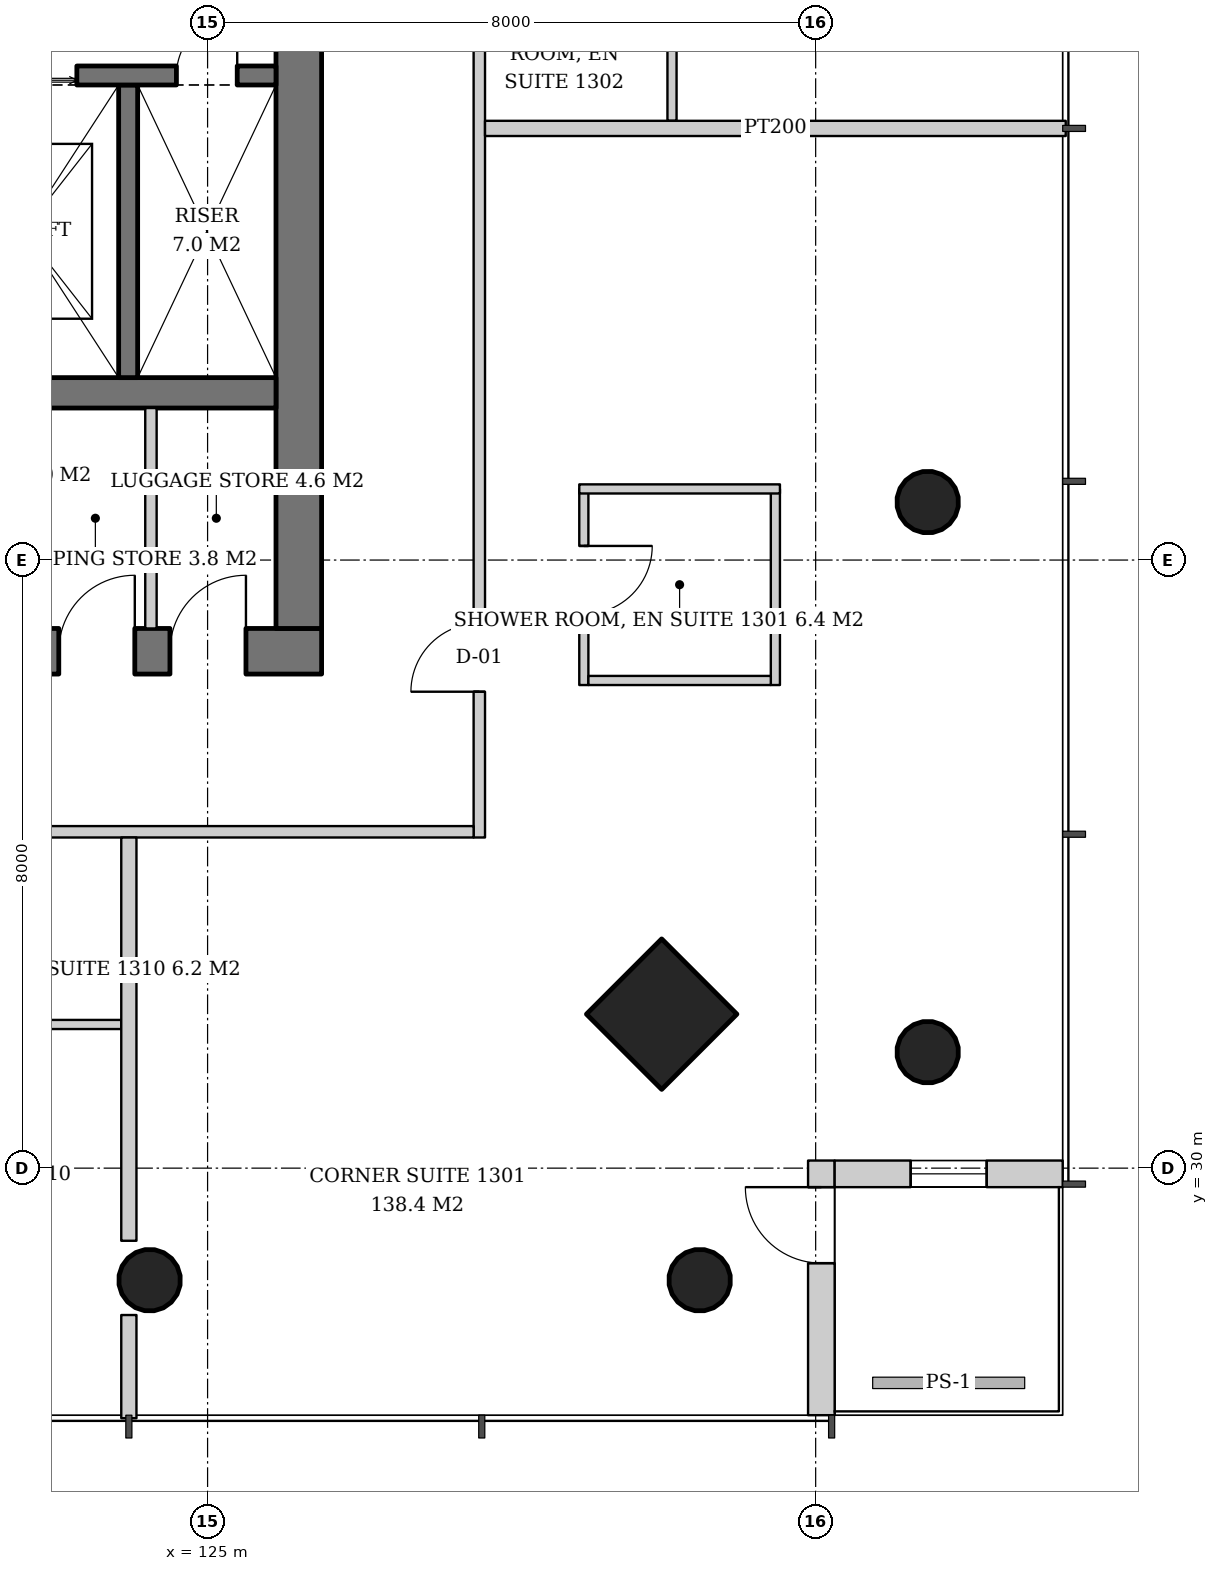
"""IFC4 building model, lengths in metres.
Left out: names, types, materials, properties, quantities, classifications, styles, units other than length and angle.
Written with IfcOpenShell. Run it as: python <this file> out.ifc"""

import sys

from ifc_helpers import new_model, si_unit, direction, frame, frame_2d, origin, origin_2d, place, context, subcontext, project, spatial, rectangle, hollow_circle, extrude, element, fill, save


model = new_model("IFC4")
c1 = context("Model", 3, precision=1e-05, world=origin(), true_north=direction((0.0, 1.0)))
c2 = subcontext(c1, "Body", "Model", "MODEL_VIEW")
j1 = project(units=[si_unit("LENGTHUNIT", "METRE"), si_unit("PLANEANGLEUNIT", "RADIAN")], contexts=[c1])
p1 = place(None, origin())
s1 = spatial("IfcSite", under=j1, at=p1, CompositionType="ELEMENT")
p2 = place(p1, origin())
s2 = spatial("IfcBuilding", under=s1, at=p2, CompositionType="ELEMENT")
p3 = place(p2, frame((0.0, 0.0, 55.2)))
s3 = spatial("IfcBuildingStorey", under=s2, at=p3, CompositionType="ELEMENT", Elevation=55.2)
p4 = place(p3, frame((134.526, 31.474, 0.0), z_axis=(-0.043029647111, 0.043029647111, 0.998146732169), x_axis=(-0.707106781187, -0.707106781187, 0.0)))
e1 = element("IfcColumn", 1, at=p4, inside=s3, PredefinedType="COLUMN", context=c2, shape_type="SweptSolid", body=[
    extrude(hollow_circle(Radius=0.406, WallThickness=0.03, at=origin_2d()), origin(), (0.0, 0.0, 1.0), 3.807),
])
p5 = place(p3, frame((134.526, 38.737, 0.0), z_axis=(-0.043059584825, 0.021497706284, 0.998841188968), x_axis=(-0.446680166538, -0.894693706707, 0.0)))
e2 = element("IfcColumn", 2, at=p5, inside=s3, PredefinedType="COLUMN", context=c2, shape_type="SweptSolid", body=[
    extrude(hollow_circle(Radius=0.406, WallThickness=0.03, at=origin_2d()), origin(), (0.0, 0.0, 1.0), 3.804),
])
p6 = place(p3, frame((131.026, 31.974, 0.0), z_axis=(-0.043029647111, 0.043029647111, 0.998146732169), x_axis=(-0.707106781187, -0.707106781187, 0.0)))
e3 = element("IfcColumn", 3, at=p6, inside=s3, PredefinedType="COLUMN", context=c2, shape_type="SweptSolid", body=[
    extrude(rectangle(XDim=1.4, YDim=1.4, at=origin_2d()), origin(), (0.0, 0.0, 1.0), 3.807),
])
p7 = place(p3, frame((131.526, 28.474, 0.0), z_axis=(-0.043029647111, 0.043029647111, 0.998146732169), x_axis=(-0.707106781187, -0.707106781187, 0.0)))
e4 = element("IfcColumn", 4, at=p7, inside=s3, PredefinedType="COLUMN", context=c2, shape_type="SweptSolid", body=[
    extrude(hollow_circle(Radius=0.406, WallThickness=0.03, at=origin_2d()), origin(), (0.0, 0.0, 1.0), 3.807),
])
p8 = place(p3, frame((124.263, 28.474, 0.0), z_axis=(-0.021497706284, 0.043059584825, 0.998841188968), x_axis=(-0.894693706707, -0.446680166538, 0.0)))
e5 = element("IfcColumn", 5, at=p8, inside=s3, PredefinedType="COLUMN", context=c2, shape_type="SweptSolid", body=[
    extrude(hollow_circle(Radius=0.406, WallThickness=0.03, at=origin_2d()), origin(), (0.0, 0.0, 1.0), 3.804),
])
p9 = place(p3, frame((107.5, 36.8, 0.0), z_axis=(0.0, 0.0, 1.0), x_axis=(1.0, 0.0, 0.0)))
e6 = element("IfcWall", 6, at=p9, inside=s3, PredefinedType="SHEAR", context=c2, shape_type="SweptSolid", body=[
    extrude(rectangle(XDim=19.0, YDim=0.6, at=frame_2d((9.5, 0.0))), origin(), (0.0, 0.0, 1.0), 3.8),
])
p10 = place(p9, frame((3.9, 0.0, 0.0)))
e7 = element("IfcOpeningElement", 7, at=p10, cuts=e6, PredefinedType="OPENING", context=c2, shape_type="SweptSolid", body=[
    extrude(rectangle(XDim=1.0, YDim=2.1, at=frame_2d((0.5, 1.05))), frame((0.0, 0.31, 0.0), z_axis=(0.0, -1.0, 0.0), x_axis=(1.0, 0.0, 0.0)), (0.0, 0.0, 1.0), 0.62),
])
p11 = place(p9, frame((14.08, 0.0, 0.0)))
e8 = element("IfcOpeningElement", 8, at=p11, cuts=e6, PredefinedType="OPENING", context=c2, shape_type="SweptSolid", body=[
    extrude(rectangle(XDim=1.0, YDim=2.1, at=frame_2d((0.5, 1.05))), frame((0.0, 0.31, 0.0), z_axis=(0.0, -1.0, 0.0), x_axis=(1.0, 0.0, 0.0)), (0.0, 0.0, 1.0), 0.62),
])
p12 = place(p9, frame((15.542, 0.0, 0.0)))
e9 = element("IfcOpeningElement", 9, at=p12, cuts=e6, PredefinedType="OPENING", context=c2, shape_type="SweptSolid", body=[
    extrude(rectangle(XDim=1.0, YDim=2.1, at=frame_2d((0.5, 1.05))), frame((0.0, 0.31, 0.0), z_axis=(0.0, -1.0, 0.0), x_axis=(1.0, 0.0, 0.0)), (0.0, 0.0, 1.0), 0.62),
])
p13 = place(p9, frame((17.005, 0.0, 0.0)))
e10 = element("IfcOpeningElement", 10, at=p13, cuts=e6, PredefinedType="OPENING", context=c2, shape_type="SweptSolid", body=[
    extrude(rectangle(XDim=1.0, YDim=2.1, at=frame_2d((0.5, 1.05))), frame((0.0, 0.31, 0.0), z_axis=(0.0, -1.0, 0.0), x_axis=(1.0, 0.0, 0.0)), (0.0, 0.0, 1.0), 0.62),
])
p14 = place(p3, frame((126.2, 37.1, 0.0), z_axis=(0.0, 0.0, 1.0), x_axis=(0.0, 1.0, 0.0)))
e11 = element("IfcWall", 11, at=p14, inside=s3, PredefinedType="SHEAR", context=c2, shape_type="SweptSolid", body=[
    extrude(rectangle(XDim=17.8, YDim=0.6, at=frame_2d((8.9, 0.0))), origin(), (0.0, 0.0, 1.0), 3.8),
])
p15 = place(p14, frame((8.0, 0.0, 0.0)))
e12 = element("IfcOpeningElement", 12, at=p15, cuts=e11, PredefinedType="OPENING", context=c2, shape_type="SweptSolid", body=[
    extrude(rectangle(XDim=1.8, YDim=2.4, at=frame_2d((0.9, 1.2))), frame((0.0, 0.31, 0.0), z_axis=(0.0, -1.0, 0.0), x_axis=(1.0, 0.0, 0.0)), (0.0, 0.0, 1.0), 0.62),
])
p16 = place(p3, frame((108.1, 40.2, 0.0), z_axis=(0.0, 0.0, 1.0), x_axis=(1.0, 0.0, 0.0)))
e13 = element("IfcWall", 13, at=p16, inside=s3, PredefinedType="SHEAR", context=c2, shape_type="SweptSolid", body=[
    extrude(rectangle(XDim=17.8, YDim=0.4, at=frame_2d((8.9, 0.0))), origin(), (0.0, 0.0, 1.0), 3.8),
])
p17 = place(p3, frame((133.075, 26.75, 0.0), z_axis=(0.0, 0.0, 1.0), x_axis=(0.0, 1.0, 0.0)))
e14 = element("IfcWall", 14, at=p17, inside=s3, PredefinedType="SOLIDWALL", context=c2, shape_type="SweptSolid", body=[
    extrude(rectangle(XDim=3.35, YDim=0.35, at=frame_2d((1.675, 0.0))), origin(), (0.0, 0.0, 1.0), 3.6),
])
p18 = place(p17, frame((2.0, 0.0, 0.0)))
e15 = element("IfcOpeningElement", 15, at=p18, cuts=e14, PredefinedType="OPENING", context=c2, shape_type="SweptSolid", body=[
    extrude(rectangle(XDim=1.0, YDim=2.4, at=frame_2d((0.5, 1.2))), frame((0.0, 0.185, 0.0), z_axis=(0.0, -1.0, 0.0), x_axis=(1.0, 0.0, 0.0)), (0.0, 0.0, 1.0), 0.37),
])
p19 = place(p3, frame((133.25, 29.925, 0.0), z_axis=(0.0, 0.0, 1.0), x_axis=(1.0, 0.0, 0.0)))
e16 = element("IfcWall", 16, at=p19, inside=s3, PredefinedType="SOLIDWALL", context=c2, shape_type="SweptSolid", body=[
    extrude(rectangle(XDim=3.0, YDim=0.35, at=frame_2d((1.5, 0.0))), origin(), (0.0, 0.0, 1.0), 3.6),
])
p20 = place(p19, frame((1.0, 0.0, 0.9)))
e17 = element("IfcOpeningElement", 17, at=p20, cuts=e16, PredefinedType="OPENING", context=c2, shape_type="SweptSolid", body=[
    extrude(rectangle(XDim=1.0, YDim=2.4, at=frame_2d((0.5, 1.2))), frame((0.0, 0.185, 0.0), z_axis=(0.0, -1.0, 0.0), x_axis=(1.0, 0.0, 0.0)), (0.0, 0.0, 1.0), 0.37),
])
p21 = place(p3, frame((123.955, 44.25, 0.0), z_axis=(0.0, 0.0, 1.0), x_axis=(0.0, -1.0, 0.0)))
e18 = element("IfcWall", 18, at=p21, inside=s3, PredefinedType="SHEAR", context=c2, shape_type="SweptSolid", body=[
    extrude(rectangle(XDim=3.85, YDim=0.25, at=frame_2d((1.925, 0.0))), origin(), (0.0, 0.0, 1.0), 3.8),
])
p22 = place(p3, frame((121.33, 44.375, 0.0), z_axis=(0.0, 0.0, 1.0), x_axis=(1.0, 0.0, 0.0)))
e19 = element("IfcWall", 19, at=p22, inside=s3, PredefinedType="SHEAR", context=c2, shape_type="SweptSolid", body=[
    extrude(rectangle(XDim=4.57, YDim=0.25, at=frame_2d((2.285, 0.0))), origin(), (0.0, 0.0, 1.0), 3.8),
])
p23 = place(p22, frame((0.55, 0.0, 0.0)))
e20 = element("IfcOpeningElement", 20, at=p23, cuts=e19, PredefinedType="OPENING", context=c2, shape_type="SweptSolid", body=[
    extrude(rectangle(XDim=1.4, YDim=2.4, at=frame_2d((0.7, 1.2))), frame((0.0, 0.135, 0.0), z_axis=(0.0, -1.0, 0.0), x_axis=(1.0, 0.0, 0.0)), (0.0, 0.0, 1.0), 0.27),
])
p24 = place(p22, frame((3.26, 0.0, 0.0)))
e21 = element("IfcOpeningElement", 21, at=p24, cuts=e19, PredefinedType="OPENING", context=c2, shape_type="SweptSolid", body=[
    extrude(rectangle(XDim=0.8, YDim=2.0, at=frame_2d((0.4, 1.0))), frame((0.0, 0.135, 0.0), z_axis=(0.0, -1.0, 0.0), x_axis=(1.0, 0.0, 0.0)), (0.0, 0.0, 1.0), 0.27),
])
p25 = place(p3, frame((124.255, 37.1, 0.0), z_axis=(0.0, 0.0, 1.0), x_axis=(0.0, 1.0, 0.0)))
e22 = element("IfcWall", 22, at=p25, inside=s3, PredefinedType="SOLIDWALL", context=c2, shape_type="SweptSolid", body=[
    extrude(rectangle(XDim=2.9, YDim=0.15, at=frame_2d((1.45, 0.0))), origin(), (0.0, 0.0, 1.0), 3.6),
])
p26 = place(p3, frame((129.95, 38.936, 0.0), z_axis=(0.0, 0.0, 1.0), x_axis=(0.0, -1.0, 0.0)))
e23 = element("IfcWall", 23, at=p26, inside=s3, PredefinedType="PARTITIONING", context=c2, shape_type="SweptSolid", body=[
    extrude(rectangle(XDim=2.58, YDim=0.12, at=frame_2d((1.29, 0.0))), origin(), (0.0, 0.0, 1.0), 2.8),
])
p27 = place(p26, frame((0.75, 0.0, 0.0)))
e24 = element("IfcOpeningElement", 24, at=p27, cuts=e23, PredefinedType="OPENING", context=c2, shape_type="SweptSolid", body=[
    extrude(rectangle(XDim=0.9, YDim=2.1, at=frame_2d((0.45, 1.05))), frame((0.0, 0.07, 0.0), z_axis=(0.0, -1.0, 0.0), x_axis=(1.0, 0.0, 0.0)), (0.0, 0.0, 1.0), 0.14),
])
p28 = place(p3, frame((132.47, 38.936, 0.0), z_axis=(0.0, 0.0, 1.0), x_axis=(0.0, -1.0, 0.0)))
e25 = element("IfcWall", 25, at=p28, inside=s3, PredefinedType="PARTITIONING", context=c2, shape_type="SweptSolid", body=[
    extrude(rectangle(XDim=2.58, YDim=0.12, at=frame_2d((1.29, 0.0))), origin(), (0.0, 0.0, 1.0), 2.8),
])
p29 = place(p3, frame((130.01, 36.416, 0.0), z_axis=(0.0, 0.0, 1.0), x_axis=(1.0, 0.0, 0.0)))
e26 = element("IfcWall", 26, at=p29, inside=s3, PredefinedType="PARTITIONING", context=c2, shape_type="SweptSolid", body=[
    extrude(rectangle(XDim=2.4, YDim=0.12, at=frame_2d((1.2, 0.0))), origin(), (0.0, 0.0, 1.0), 2.847),
])
p30 = place(p3, frame((129.89, 38.936, 0.0), z_axis=(0.0, 0.0, 1.0), x_axis=(1.0, 0.0, 0.0)))
e27 = element("IfcWall", 27, at=p30, inside=s3, PredefinedType="PARTITIONING", context=c2, shape_type="SweptSolid", body=[
    extrude(rectangle(XDim=2.64, YDim=0.12, at=frame_2d((1.32, 0.0))), origin(), (0.0, 0.0, 1.0), 3.6),
])
p31 = place(p3, frame((131.11, 43.779, 0.0), z_axis=(0.0, 0.0, 1.0), x_axis=(0.0, 1.0, 0.0)))
e28 = element("IfcWall", 28, at=p31, inside=s3, PredefinedType="PARTITIONING", context=c2, shape_type="SweptSolid", body=[
    extrude(rectangle(XDim=2.42, YDim=0.12, at=frame_2d((1.21, 0.0))), origin(), (0.0, 0.0, 1.0), 2.847),
])
p32 = place(p3, frame((128.575, 34.35, 0.0), z_axis=(0.0, 0.0, 1.0), x_axis=(0.0, 1.0, 0.0)))
e29 = element("IfcWall", 29, at=p32, inside=s3, PredefinedType="PARTITIONING", context=c2, shape_type="SweptSolid", body=[
    extrude(rectangle(XDim=23.15, YDim=0.15, at=frame_2d((11.575, 0.0))), origin(), (0.0, 0.0, 1.0), 2.8),
])
p33 = place(p32, frame((1.918, 0.0, 0.0)))
e30 = element("IfcOpeningElement", 30, at=p33, cuts=e29, PredefinedType="OPENING", context=c2, shape_type="SweptSolid", body=[
    extrude(rectangle(XDim=0.9, YDim=2.1, at=frame_2d((0.45, 1.05))), frame((0.0, 0.085, 0.0), z_axis=(0.0, -1.0, 0.0), x_axis=(1.0, 0.0, 0.0)), (0.0, 0.0, 1.0), 0.17),
])
p34 = place(p32, frame((12.079, 0.0, 0.0)))
e31 = element("IfcOpeningElement", 31, at=p34, cuts=e29, PredefinedType="OPENING", context=c2, shape_type="SweptSolid", body=[
    extrude(rectangle(XDim=0.9, YDim=2.1, at=frame_2d((0.45, 1.05))), frame((0.0, 0.085, 0.0), z_axis=(0.0, -1.0, 0.0), x_axis=(1.0, 0.0, 0.0)), (0.0, 0.0, 1.0), 0.17),
])
p35 = place(p3, frame((128.65, 43.678, 0.0), z_axis=(0.0, 0.0, 1.0), x_axis=(1.0, 0.0, 0.0)))
e32 = element("IfcWall", 32, at=p35, inside=s3, PredefinedType="PARTITIONING", context=c2, shape_type="SweptSolid", body=[
    extrude(rectangle(XDim=7.64, YDim=0.2, at=frame_2d((3.82, 0.0))), origin(), (0.0, 0.0, 1.0), 3.05),
])
p36 = place(p3, frame((121.444, 31.89, 0.0), z_axis=(0.0, 0.0, 1.0), x_axis=(1.0, 0.0, 0.0)))
e33 = element("IfcWall", 33, at=p36, inside=s3, PredefinedType="PARTITIONING", context=c2, shape_type="SweptSolid", body=[
    extrude(rectangle(XDim=2.42, YDim=0.12, at=frame_2d((1.21, 0.0))), origin(), (0.0, 0.0, 1.0), 3.6),
])
p37 = place(p3, frame((105.35, 34.425, 0.0), z_axis=(0.0, 0.0, 1.0), x_axis=(1.0, 0.0, 0.0)))
e34 = element("IfcWall", 34, at=p37, inside=s3, PredefinedType="PARTITIONING", context=c2, shape_type="SweptSolid", body=[
    extrude(rectangle(XDim=23.15, YDim=0.15, at=frame_2d((11.575, 0.0))), origin(), (0.0, 0.0, 1.0), 2.8),
])
p38 = place(p37, frame((1.918, 0.0, 0.0)))
e35 = element("IfcOpeningElement", 35, at=p38, cuts=e34, PredefinedType="OPENING", context=c2, shape_type="SweptSolid", body=[
    extrude(rectangle(XDim=0.9, YDim=2.1, at=frame_2d((0.45, 1.05))), frame((0.0, 0.085, 0.0), z_axis=(0.0, -1.0, 0.0), x_axis=(1.0, 0.0, 0.0)), (0.0, 0.0, 1.0), 0.17),
])
p39 = place(p37, frame((12.079, 0.0, 0.0)))
e36 = element("IfcOpeningElement", 36, at=p39, cuts=e34, PredefinedType="OPENING", context=c2, shape_type="SweptSolid", body=[
    extrude(rectangle(XDim=0.9, YDim=2.1, at=frame_2d((0.45, 1.05))), frame((0.0, 0.085, 0.0), z_axis=(0.0, -1.0, 0.0), x_axis=(1.0, 0.0, 0.0)), (0.0, 0.0, 1.0), 0.17),
])
p40 = place(p37, frame((14.964, 0.0, 0.0)))
e37 = element("IfcOpeningElement", 37, at=p40, cuts=e34, PredefinedType="OPENING", context=c2, shape_type="SweptSolid", body=[
    extrude(rectangle(XDim=0.9, YDim=2.1, at=frame_2d((0.45, 1.05))), frame((0.0, 0.085, 0.0), z_axis=(0.0, -1.0, 0.0), x_axis=(1.0, 0.0, 0.0)), (0.0, 0.0, 1.0), 0.17),
])
p41 = place(p3, frame((123.964, 34.35, 0.0), z_axis=(0.0, 0.0, 1.0), x_axis=(0.0, -1.0, 0.0)))
e38 = element("IfcWall", 38, at=p41, inside=s3, PredefinedType="PARTITIONING", context=c2, shape_type="SweptSolid", body=[
    extrude(rectangle(XDim=5.306, YDim=0.2, at=frame_2d((2.653, 0.0))), origin(), (0.0, 0.0, 1.0), 3.6),
])
p42 = place(p3, frame((123.964, 28.068, 0.0), z_axis=(0.0, 0.0, 1.0), x_axis=(0.0, -1.0, 0.0)))
e39 = element("IfcWall", 39, at=p42, inside=s3, PredefinedType="PARTITIONING", context=c2, shape_type="SweptSolid", body=[
    extrude(rectangle(XDim=1.358, YDim=0.2, at=frame_2d((0.679, 0.0))), origin(), (0.0, 0.0, 1.0), 3.6),
])
p43 = place(p18, origin())
e40 = element("IfcDoor", 40, at=p43, inside=s3, OperationType="SINGLE_SWING_RIGHT", PredefinedType="DOOR", context=c2, shape_type="SweptSolid", body=[
    extrude(rectangle(XDim=1.0, YDim=2.4, at=frame_2d((0.5, 1.2))), frame((0.0, 0.025, 0.0), z_axis=(0.0, -1.0, 0.0), x_axis=(1.0, 0.0, 0.0)), (0.0, 0.0, 1.0), 0.05),
])
fill(e15, e40)
p44 = place(p20, origin())
e41 = element("IfcWindow", 41, at=p44, inside=s3, PartitioningType="SINGLE_PANEL", PredefinedType="WINDOW", context=c2, shape_type="SweptSolid", body=[
    extrude(rectangle(XDim=1.0, YDim=2.4, at=frame_2d((0.5, 1.2))), frame((0.0, 0.03, 0.0), z_axis=(0.0, -1.0, 0.0), x_axis=(1.0, 0.0, 0.0)), (0.0, 0.0, 1.0), 0.06),
])
fill(e17, e41)
p45 = place(p23, origin())
e42 = element("IfcDoor", 42, at=p45, inside=s3, OperationType="DOUBLE_DOOR_SLIDING", PredefinedType="DOOR", context=c2, shape_type="SweptSolid", body=[
    extrude(rectangle(XDim=1.4, YDim=2.4, at=frame_2d((0.7, 1.2))), frame((0.0, 0.025, 0.0), z_axis=(0.0, -1.0, 0.0), x_axis=(1.0, 0.0, 0.0)), (0.0, 0.0, 1.0), 0.05),
])
fill(e20, e42)
p46 = place(p24, origin())
e43 = element("IfcDoor", 43, at=p46, inside=s3, OperationType="SINGLE_SWING_RIGHT", PredefinedType="DOOR", context=c2, shape_type="SweptSolid", body=[
    extrude(rectangle(XDim=0.8, YDim=2.0, at=frame_2d((0.4, 1.0))), frame((0.0, 0.025, 0.0), z_axis=(0.0, -1.0, 0.0), x_axis=(1.0, 0.0, 0.0)), (0.0, 0.0, 1.0), 0.05),
])
fill(e21, e43)
p47 = place(p12, origin())
e44 = element("IfcDoor", 44, at=p47, inside=s3, OperationType="SINGLE_SWING_RIGHT", PredefinedType="DOOR", context=c2, shape_type="SweptSolid", body=[
    extrude(rectangle(XDim=1.0, YDim=2.1, at=frame_2d((0.5, 1.05))), frame((0.0, 0.29, 0.0), z_axis=(0.0, -1.0, 0.0), x_axis=(1.0, 0.0, 0.0)), (0.0, 0.0, 1.0), 0.05),
])
fill(e9, e44)
p48 = place(p13, origin())
e45 = element("IfcDoor", 45, at=p48, inside=s3, OperationType="SINGLE_SWING_RIGHT", PredefinedType="DOOR", context=c2, shape_type="SweptSolid", body=[
    extrude(rectangle(XDim=1.0, YDim=2.1, at=frame_2d((0.5, 1.05))), frame((0.0, 0.29, 0.0), z_axis=(0.0, -1.0, 0.0), x_axis=(1.0, 0.0, 0.0)), (0.0, 0.0, 1.0), 0.05),
])
fill(e10, e45)
p49 = place(p27, origin())
e46 = element("IfcDoor", 46, at=p49, inside=s3, OperationType="SINGLE_SWING_LEFT", PredefinedType="DOOR", context=c2, shape_type="SweptSolid", body=[
    extrude(rectangle(XDim=0.9, YDim=2.1, at=frame_2d((0.45, 1.05))), frame((0.0, 0.025, 0.0), z_axis=(0.0, -1.0, 0.0), x_axis=(1.0, 0.0, 0.0)), (0.0, 0.0, 1.0), 0.05),
])
fill(e24, e46)
p50 = place(p33, origin())
e47 = element("IfcDoor", 47, at=p50, inside=s3, OperationType="SINGLE_SWING_LEFT", PredefinedType="DOOR", context=c2, shape_type="SweptSolid", body=[
    extrude(rectangle(XDim=0.9, YDim=2.1, at=frame_2d((0.45, 1.05))), frame((0.0, 0.025, 0.0), z_axis=(0.0, -1.0, 0.0), x_axis=(1.0, 0.0, 0.0)), (0.0, 0.0, 1.0), 0.05),
])
fill(e30, e47)
save(model, sys.argv[1])
